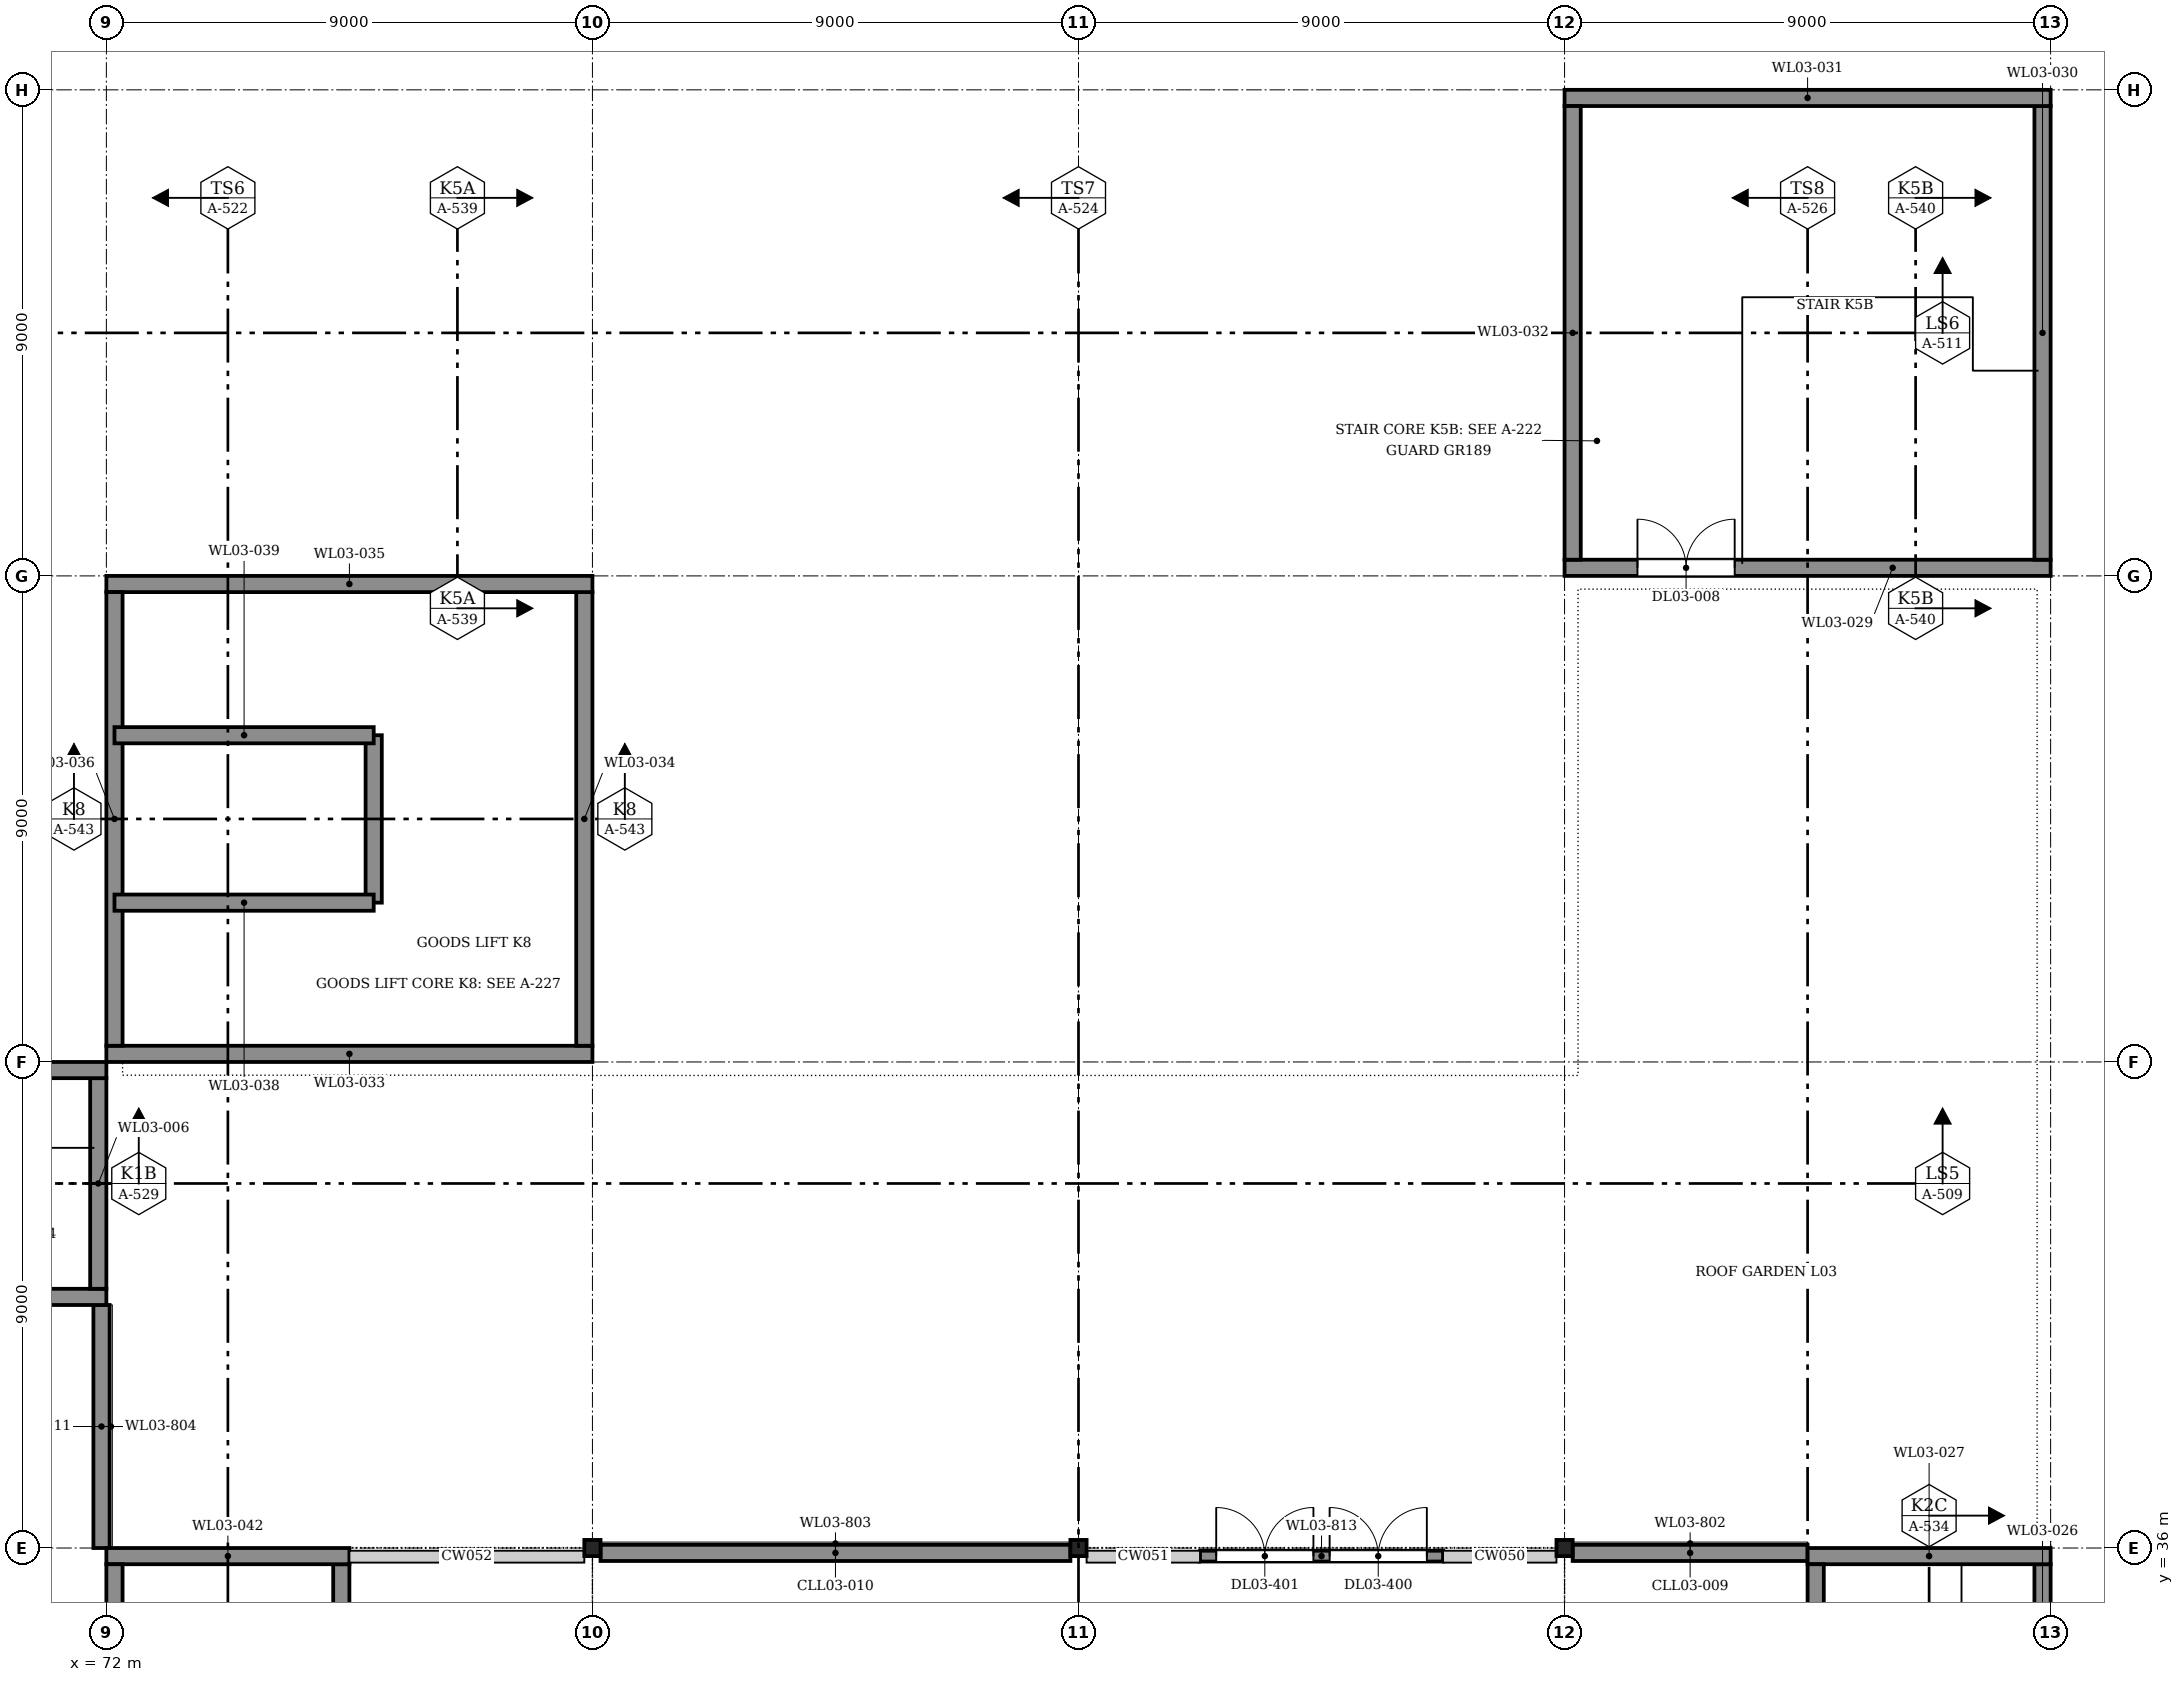
"""IFC4 building model, lengths in metres.
Left out: names, types, materials, properties, quantities, classifications, styles, units other than length and angle.
Written with IfcOpenShell. Run it as: python <this file> out.ifc"""

import sys

from ifc_helpers import new_model, si_unit, direction, frame, frame_2d, origin, origin_2d, place, context, subcontext, project, spatial, rectangle, hollow_rectangle, extrude, element, fill, save


model = new_model("IFC4")
c1 = context("Model", 3, precision=1e-05, world=origin(), true_north=direction((0.0, 1.0)))
c2 = subcontext(c1, "Body", "Model", "MODEL_VIEW")
j1 = project(units=[si_unit("LENGTHUNIT", "METRE"), si_unit("PLANEANGLEUNIT", "RADIAN")], contexts=[c1])
p1 = place(None, origin())
s1 = spatial("IfcSite", under=j1, at=p1, CompositionType="ELEMENT")
p2 = place(p1, origin())
s2 = spatial("IfcBuilding", under=s1, at=p2, CompositionType="ELEMENT")
p3 = place(p2, frame((0.0, 0.0, 13.4)))
s3 = spatial("IfcBuildingStorey", under=s2, at=p3, CompositionType="ELEMENT", Elevation=13.4)
p4 = place(p3, frame((81.0, 36.0, 0.0), z_axis=(0.0, 0.0, 1.0), x_axis=(1.0, 0.0, 0.0)))
e1 = element("IfcColumn", 1, at=p4, inside=s3, PredefinedType="COLUMN", context=c2, shape_type="SweptSolid", body=[
    extrude(hollow_rectangle(XDim=0.3, YDim=0.3, WallThickness=0.016, InnerFilletRadius=0.024, OuterFilletRadius=0.04, at=origin_2d()), origin(), (0.0, 0.0, 1.0), 7.8),
])
p5 = place(p3, frame((90.0, 36.0, 0.0), z_axis=(0.0, 0.0, 1.0), x_axis=(1.0, 0.0, 0.0)))
e2 = element("IfcColumn", 2, at=p5, inside=s3, PredefinedType="COLUMN", context=c2, shape_type="SweptSolid", body=[
    extrude(hollow_rectangle(XDim=0.3, YDim=0.3, WallThickness=0.01, InnerFilletRadius=0.015, OuterFilletRadius=0.025, at=origin_2d()), origin(), (0.0, 0.0, 1.0), 7.8),
])
p6 = place(p3, frame((99.0, 36.0, 0.0), z_axis=(0.0, 0.0, 1.0), x_axis=(1.0, 0.0, 0.0)))
e3 = element("IfcColumn", 3, at=p6, inside=s3, PredefinedType="COLUMN", context=c2, shape_type="SweptSolid", body=[
    extrude(hollow_rectangle(XDim=0.3, YDim=0.3, WallThickness=0.016, InnerFilletRadius=0.024, OuterFilletRadius=0.04, at=origin_2d()), origin(), (0.0, 0.0, 1.0), 7.8),
])
p7 = place(p3, frame((99.15, 35.91, 0.0), z_axis=(0.0, 0.0, 1.0), x_axis=(1.0, 0.0, 0.0)))
e4 = element("IfcWall", 4, at=p7, inside=s3, PredefinedType="SOLIDWALL", context=c2, shape_type="SweptSolid", body=[
    extrude(rectangle(XDim=4.35, YDim=0.3, at=frame_2d((2.175, 0.0))), origin(), (0.0, 0.0, 1.0), 6.935),
])
p8 = place(p3, frame((81.15, 35.91, 0.0), z_axis=(0.0, 0.0, 1.0), x_axis=(1.0, 0.0, 0.0)))
e5 = element("IfcWall", 5, at=p8, inside=s3, PredefinedType="SOLIDWALL", context=c2, shape_type="SweptSolid", body=[
    extrude(rectangle(XDim=8.7, YDim=0.3, at=frame_2d((4.35, 0.0))), origin(), (0.0, 0.0, 1.0), 6.935),
])
p9 = place(p3, frame((71.91, 36.0, 0.0), z_axis=(0.0, 0.0, 1.0), x_axis=(0.0, 1.0, 0.0)))
e6 = element("IfcWall", 6, at=p9, inside=s3, PredefinedType="SOLIDWALL", context=c2, shape_type="SweptSolid", body=[
    extrude(rectangle(XDim=4.5, YDim=0.3, at=frame_2d((2.25, 0.0))), origin(), (0.0, 0.0, 1.0), 7.678),
])
p10 = place(p3, frame((92.25, 35.85, 0.0), z_axis=(0.0, 0.0, 1.0), x_axis=(1.0, 0.0, 0.0)))
e7 = element("IfcWall", 7, at=p10, inside=s3, PredefinedType="SOLIDWALL", context=c2, shape_type="SweptSolid", body=[
    extrude(rectangle(XDim=4.5, YDim=0.2, at=frame_2d((2.25, 0.0))), origin(), (0.0, 0.0, 1.0), 7.635),
])
p11 = place(p10, frame((2.4, 0.0, 0.0)))
e8 = element("IfcOpeningElement", 8, at=p11, cuts=e7, PredefinedType="OPENING", context=c2, shape_type="SweptSolid", body=[
    extrude(rectangle(XDim=1.8, YDim=2.4, at=frame_2d((0.9, 1.2))), frame((0.0, 0.11, 0.0), z_axis=(0.0, -1.0, 0.0), x_axis=(1.0, 0.0, 0.0)), (0.0, 0.0, 1.0), 0.22),
])
p12 = place(p10, frame((0.3, 0.0, 0.0)))
e9 = element("IfcOpeningElement", 9, at=p12, cuts=e7, PredefinedType="OPENING", context=c2, shape_type="SweptSolid", body=[
    extrude(rectangle(XDim=1.8, YDim=2.4, at=frame_2d((0.9, 1.2))), frame((0.0, 0.11, 0.0), z_axis=(0.0, -1.0, 0.0), x_axis=(1.0, 0.0, 0.0)), (0.0, 0.0, 1.0), 0.22),
])
p13 = place(p3, frame((63.0, 40.65, 0.0), z_axis=(0.0, 0.0, 1.0), x_axis=(1.0, 0.0, 0.0)))
e10 = element("IfcWall", 10, at=p13, inside=s3, PredefinedType="SOLIDWALL", context=c2, shape_type="SweptSolid", body=[
    extrude(rectangle(XDim=9.0, YDim=0.3, at=frame_2d((4.5, 0.0))), origin(), (0.0, 0.0, 1.0), 7.428),
])
p14 = place(p13, frame((1.15, 0.0, 0.0)))
e11 = element("IfcOpeningElement", 11, at=p14, cuts=e10, PredefinedType="OPENING", context=c2, shape_type="SweptSolid", body=[
    extrude(rectangle(XDim=1.8, YDim=2.1, at=frame_2d((0.9, 1.05))), frame((0.0, 0.16, 0.0), z_axis=(0.0, -1.0, 0.0), x_axis=(1.0, 0.0, 0.0)), (0.0, 0.0, 1.0), 0.32),
])
p15 = place(p3, frame((71.85, 40.8, 0.0), z_axis=(0.0, 0.0, 1.0), x_axis=(0.0, 1.0, 0.0)))
e12 = element("IfcWall", 12, at=p15, inside=s3, PredefinedType="SOLIDWALL", context=c2, shape_type="SweptSolid", body=[
    extrude(rectangle(XDim=3.9, YDim=0.3, at=frame_2d((1.95, 0.0))), origin(), (0.0, 0.0, 1.0), 7.428),
])
p16 = place(p3, frame((63.0, 44.85, 0.0), z_axis=(0.0, 0.0, 1.0), x_axis=(1.0, 0.0, 0.0)))
e13 = element("IfcWall", 13, at=p16, inside=s3, PredefinedType="SOLIDWALL", context=c2, shape_type="SweptSolid", body=[
    extrude(rectangle(XDim=9.0, YDim=0.3, at=frame_2d((4.5, 0.0))), origin(), (0.0, 0.0, 1.0), 7.428),
])
p17 = place(p3, frame((107.85, 27.3, 0.0), z_axis=(0.0, 0.0, 1.0), x_axis=(0.0, 1.0, 0.0)))
e14 = element("IfcWall", 14, at=p17, inside=s3, PredefinedType="SOLIDWALL", context=c2, shape_type="SweptSolid", body=[
    extrude(rectangle(XDim=8.4, YDim=0.3, at=frame_2d((4.2, 0.0))), origin(), (0.0, 0.0, 1.0), 7.8),
])
p18 = place(p3, frame((103.5, 35.85, 0.0), z_axis=(0.0, 0.0, 1.0), x_axis=(1.0, 0.0, 0.0)))
e15 = element("IfcWall", 15, at=p18, inside=s3, PredefinedType="SOLIDWALL", context=c2, shape_type="SweptSolid", body=[
    extrude(rectangle(XDim=4.5, YDim=0.3, at=frame_2d((2.25, 0.0))), origin(), (0.0, 0.0, 1.0), 7.8),
])
p19 = place(p3, frame((103.65, 27.3, 0.0), z_axis=(0.0, 0.0, 1.0), x_axis=(0.0, 1.0, 0.0)))
e16 = element("IfcWall", 16, at=p19, inside=s3, PredefinedType="SOLIDWALL", context=c2, shape_type="SweptSolid", body=[
    extrude(rectangle(XDim=8.4, YDim=0.3, at=frame_2d((4.2, 0.0))), origin(), (0.0, 0.0, 1.0), 7.8),
])
p20 = place(p3, frame((99.0, 54.15, 0.0), z_axis=(0.0, 0.0, 1.0), x_axis=(1.0, 0.0, 0.0)))
e17 = element("IfcWall", 17, at=p20, inside=s3, PredefinedType="SOLIDWALL", context=c2, shape_type="SweptSolid", body=[
    extrude(rectangle(XDim=9.0, YDim=0.3, at=frame_2d((4.5, 0.0))), origin(), (0.0, 0.0, 1.0), 2.435),
])
p21 = place(p20, frame((1.35, 0.0, 0.0)))
e18 = element("IfcOpeningElement", 18, at=p21, cuts=e17, PredefinedType="OPENING", context=c2, shape_type="SweptSolid", body=[
    extrude(rectangle(XDim=1.8, YDim=2.1, at=frame_2d((0.9, 1.05))), frame((0.0, 0.16, 0.0), z_axis=(0.0, -1.0, 0.0), x_axis=(1.0, 0.0, 0.0)), (0.0, 0.0, 1.0), 0.32),
])
p22 = place(p3, frame((107.85, 54.3, 0.0), z_axis=(0.0, 0.0, 1.0), x_axis=(0.0, 1.0, 0.0)))
e19 = element("IfcWall", 19, at=p22, inside=s3, PredefinedType="SOLIDWALL", context=c2, shape_type="SweptSolid", body=[
    extrude(rectangle(XDim=8.4, YDim=0.3, at=frame_2d((4.2, 0.0))), origin(), (0.0, 0.0, 1.0), 2.435),
])
p23 = place(p3, frame((99.0, 62.85, 0.0), z_axis=(0.0, 0.0, 1.0), x_axis=(1.0, 0.0, 0.0)))
e20 = element("IfcWall", 20, at=p23, inside=s3, PredefinedType="SOLIDWALL", context=c2, shape_type="SweptSolid", body=[
    extrude(rectangle(XDim=9.0, YDim=0.3, at=frame_2d((4.5, 0.0))), origin(), (0.0, 0.0, 1.0), 2.435),
])
p24 = place(p3, frame((99.15, 54.3, 0.0), z_axis=(0.0, 0.0, 1.0), x_axis=(0.0, 1.0, 0.0)))
e21 = element("IfcWall", 21, at=p24, inside=s3, PredefinedType="SOLIDWALL", context=c2, shape_type="SweptSolid", body=[
    extrude(rectangle(XDim=8.4, YDim=0.3, at=frame_2d((4.2, 0.0))), origin(), (0.0, 0.0, 1.0), 2.435),
])
p25 = place(p3, frame((72.0, 45.15, 0.0), z_axis=(0.0, 0.0, 1.0), x_axis=(1.0, 0.0, 0.0)))
e22 = element("IfcWall", 22, at=p25, inside=s3, PredefinedType="SOLIDWALL", context=c2, shape_type="SweptSolid", body=[
    extrude(rectangle(XDim=9.0, YDim=0.3, at=frame_2d((4.5, 0.0))), origin(), (0.0, 0.0, 1.0), 2.35),
])
p26 = place(p3, frame((80.85, 45.3, 0.0), z_axis=(0.0, 0.0, 1.0), x_axis=(0.0, 1.0, 0.0)))
e23 = element("IfcWall", 23, at=p26, inside=s3, PredefinedType="SOLIDWALL", context=c2, shape_type="SweptSolid", body=[
    extrude(rectangle(XDim=8.4, YDim=0.3, at=frame_2d((4.2, 0.0))), origin(), (0.0, 0.0, 1.0), 2.35),
])
p27 = place(p3, frame((72.0, 53.85, 0.0), z_axis=(0.0, 0.0, 1.0), x_axis=(1.0, 0.0, 0.0)))
e24 = element("IfcWall", 24, at=p27, inside=s3, PredefinedType="SOLIDWALL", context=c2, shape_type="SweptSolid", body=[
    extrude(rectangle(XDim=9.0, YDim=0.3, at=frame_2d((4.5, 0.0))), origin(), (0.0, 0.0, 1.0), 2.35),
])
p28 = place(p3, frame((72.15, 45.3, 0.0), z_axis=(0.0, 0.0, 1.0), x_axis=(0.0, 1.0, 0.0)))
e25 = element("IfcWall", 25, at=p28, inside=s3, PredefinedType="SOLIDWALL", context=c2, shape_type="SweptSolid", body=[
    extrude(rectangle(XDim=8.4, YDim=0.3, at=frame_2d((4.2, 0.0))), origin(), (0.0, 0.0, 1.0), 2.35),
])
p29 = place(p3, frame((76.95, 47.95, 0.0), z_axis=(0.0, 0.0, 1.0), x_axis=(0.0, 1.0, 0.0)))
e26 = element("IfcWall", 26, at=p29, inside=s3, PredefinedType="SOLIDWALL", context=c2, shape_type="SweptSolid", body=[
    extrude(rectangle(XDim=3.1, YDim=0.3, at=frame_2d((1.55, 0.0))), origin(), (0.0, 0.0, 1.0), 2.35),
])
for number, where, z_axis, x_axis in (
    (27, (72.15, 47.95, 0.0), (0.0, 0.0, 1.0), (1.0, 0.0, 0.0)),
    (28, (72.15, 51.05, 0.0), (0.0, 0.0, 1.0), (1.0, 0.0, 0.0)),
):
    element("IfcWall", number, at=place(p3, frame(where, z_axis=z_axis, x_axis=x_axis)), inside=s3, PredefinedType="SOLIDWALL", context=c2, shape_type="SweptSolid", body=[
        extrude(rectangle(XDim=4.8, YDim=0.3, at=frame_2d((2.4, 0.0))), origin(), (0.0, 0.0, 1.0), 2.35),
    ])
p30 = place(p3, frame((76.35, 27.3, 0.0), z_axis=(0.0, 0.0, 1.0), x_axis=(0.0, 1.0, 0.0)))
e29 = element("IfcWall", 29, at=p30, inside=s3, PredefinedType="SOLIDWALL", context=c2, shape_type="SweptSolid", body=[
    extrude(rectangle(XDim=8.4, YDim=0.3, at=frame_2d((4.2, 0.0))), origin(), (0.0, 0.0, 1.0), 7.8),
])
p31 = place(p30, frame((0.45, 0.0, 0.0)))
e30 = element("IfcOpeningElement", 30, at=p31, cuts=e29, PredefinedType="OPENING", context=c2, shape_type="SweptSolid", body=[
    extrude(rectangle(XDim=1.4, YDim=2.1, at=frame_2d((0.7, 1.05))), frame((0.0, 0.16, 0.0), z_axis=(0.0, -1.0, 0.0), x_axis=(1.0, 0.0, 0.0)), (0.0, 0.0, 1.0), 0.32),
])
p32 = place(p30, frame((4.925, 0.0, 0.0)))
e31 = element("IfcOpeningElement", 31, at=p32, cuts=e29, PredefinedType="OPENING", context=c2, shape_type="SweptSolid", body=[
    extrude(rectangle(XDim=1.0, YDim=2.1, at=frame_2d((0.5, 1.05))), frame((0.0, 0.16, 0.0), z_axis=(0.0, -1.0, 0.0), x_axis=(1.0, 0.0, 0.0)), (0.0, 0.0, 1.0), 0.32),
])
p33 = place(p3, frame((72.0, 35.85, 0.0), z_axis=(0.0, 0.0, 1.0), x_axis=(1.0, 0.0, 0.0)))
e32 = element("IfcWall", 32, at=p33, inside=s3, PredefinedType="SOLIDWALL", context=c2, shape_type="SweptSolid", body=[
    extrude(rectangle(XDim=4.5, YDim=0.3, at=frame_2d((2.25, 0.0))), origin(), (0.0, 0.0, 1.0), 7.8),
])
p34 = place(p3, frame((72.15, 27.3, 0.0), z_axis=(0.0, 0.0, 1.0), x_axis=(0.0, 1.0, 0.0)))
e33 = element("IfcWall", 33, at=p34, inside=s3, PredefinedType="SOLIDWALL", context=c2, shape_type="SweptSolid", body=[
    extrude(rectangle(XDim=8.4, YDim=0.3, at=frame_2d((4.2, 0.0))), origin(), (0.0, 0.0, 1.0), 7.8),
])
p35 = place(p34, frame((0.45, 0.0, 0.0)))
e34 = element("IfcOpeningElement", 34, at=p35, cuts=e33, PredefinedType="OPENING", context=c2, shape_type="SweptSolid", body=[
    extrude(rectangle(XDim=1.4, YDim=2.1, at=frame_2d((0.7, 1.05))), frame((0.0, 0.16, 0.0), z_axis=(0.0, -1.0, 0.0), x_axis=(1.0, 0.0, 0.0)), (0.0, 0.0, 1.0), 0.32),
])
p36 = place(p11, origin())
e35 = element("IfcDoor", 35, at=p36, inside=s3, OperationType="DOUBLE_DOOR_SINGLE_SWING", PredefinedType="DOOR", context=c2, shape_type="SweptSolid", body=[
    extrude(rectangle(XDim=1.8, YDim=2.4, at=frame_2d((0.9, 1.2))), frame((0.0, 0.025, 0.0), z_axis=(0.0, -1.0, 0.0), x_axis=(1.0, 0.0, 0.0)), (0.0, 0.0, 1.0), 0.05),
])
fill(e8, e35)
p37 = place(p12, origin())
e36 = element("IfcDoor", 36, at=p37, inside=s3, OperationType="DOUBLE_DOOR_SINGLE_SWING", PredefinedType="DOOR", context=c2, shape_type="SweptSolid", body=[
    extrude(rectangle(XDim=1.8, YDim=2.4, at=frame_2d((0.9, 1.2))), frame((0.0, 0.025, 0.0), z_axis=(0.0, -1.0, 0.0), x_axis=(1.0, 0.0, 0.0)), (0.0, 0.0, 1.0), 0.05),
])
fill(e9, e36)
p38 = place(p2, frame((0.0, 0.0, 21.2)))
p39 = place(p38, frame((62.85, 36.125, -0.122), z_axis=(0.0, 0.0, 1.0), x_axis=(1.0, 0.0, 0.0)))
p40 = place(p39, frame((5.1, 0.0, 0.15)))
p41 = place(p40, origin())
e37 = element("IfcWindow", 37, at=p41, inside=s3, PartitioningType="SINGLE_PANEL", PredefinedType="SKYLIGHT", context=c2, shape_type="SweptSolid", body=[
    extrude(rectangle(XDim=3.6, YDim=1.0, at=frame_2d((1.8, 0.5))), frame((0.0, 0.03, 0.0), z_axis=(0.0, -1.0, 0.0), x_axis=(1.0, 0.0, 0.0)), (0.0, 0.0, 1.0), 0.06),
])
p42 = place(p21, origin())
e38 = element("IfcDoor", 38, at=p42, inside=s3, OperationType="DOUBLE_DOOR_SINGLE_SWING", PredefinedType="DOOR", context=c2, shape_type="SweptSolid", body=[
    extrude(rectangle(XDim=1.8, YDim=2.1, at=frame_2d((0.9, 1.05))), frame((0.0, 0.025, 0.0), z_axis=(0.0, -1.0, 0.0), x_axis=(1.0, 0.0, 0.0)), (0.0, 0.0, 1.0), 0.05),
])
fill(e18, e38)
save(model, sys.argv[1])
